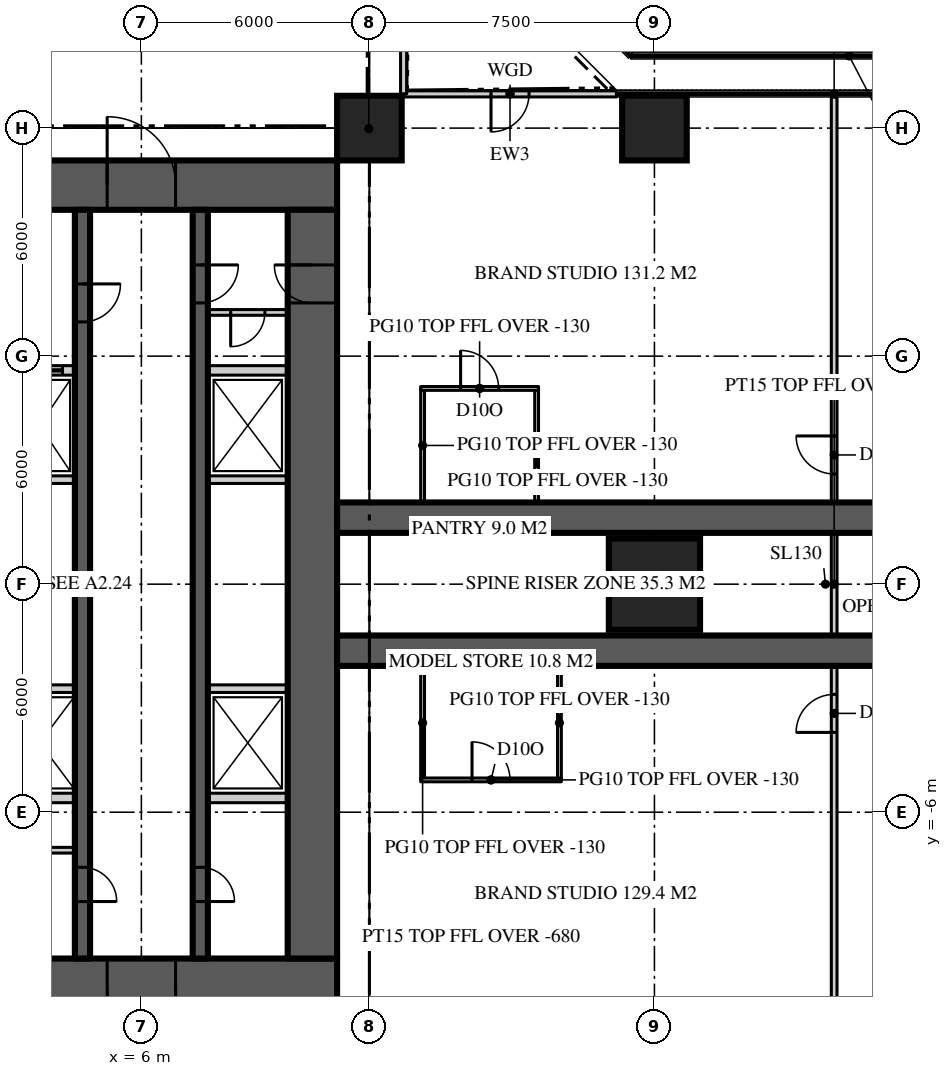
"""IFC4 building model, lengths in metres.
Left out: names, types, materials, properties, quantities, classifications, styles, units other than length and angle.
Written with IfcOpenShell. Run it as: python <this file> out.ifc"""

import sys

from ifc_helpers import new_model, si_unit, direction, frame, frame_2d, origin, origin_2d, place, context, subcontext, project, spatial, rectangle, extrude, element, fill, save


model = new_model("IFC4")
c1 = context("Model", 3, precision=1e-05, world=origin(), true_north=direction((0.0, 1.0)))
c2 = subcontext(c1, "Body", "Model", "MODEL_VIEW")
j1 = project(units=[si_unit("LENGTHUNIT", "METRE"), si_unit("PLANEANGLEUNIT", "RADIAN")], contexts=[c1])
p1 = place(None, origin())
s1 = spatial("IfcSite", under=j1, at=p1, CompositionType="ELEMENT")
p2 = place(p1, origin())
s2 = spatial("IfcBuilding", under=s1, at=p2, CompositionType="ELEMENT")
p3 = place(p2, frame((0.0, 0.0, 182.7)))
s3 = spatial("IfcBuildingStorey", under=s2, at=p3, CompositionType="ELEMENT", Elevation=182.7)
p4 = place(p3, frame((-11.15, 10.5, 0.0), z_axis=(0.0, 0.0, 1.0), x_axis=(1.0, 0.0, 0.0)))
e1 = element("IfcWall", 1, at=p4, inside=s3, PredefinedType="SHEAR", context=c2, shape_type="SweptSolid", body=[
    extrude(rectangle(XDim=22.3, YDim=1.3, at=frame_2d((11.15, 0.0))), origin(), (0.0, 0.0, 1.0), 3.9),
])
p5 = place(p4, frame((4.25, 0.0, 0.0)))
e2 = element("IfcOpeningElement", 2, at=p5, cuts=e1, PredefinedType="OPENING", context=c2, shape_type="SweptSolid", body=[
    extrude(rectangle(XDim=1.8, YDim=2.2, at=frame_2d((0.9, 1.1))), frame((0.0, 0.66, 0.0), z_axis=(0.0, -1.0, 0.0), x_axis=(1.0, 0.0, 0.0)), (0.0, 0.0, 1.0), 1.32),
])
p6 = place(p4, frame((16.25, 0.0, 0.0)))
e3 = element("IfcOpeningElement", 3, at=p6, cuts=e1, PredefinedType="OPENING", context=c2, shape_type="SweptSolid", body=[
    extrude(rectangle(XDim=1.8, YDim=2.2, at=frame_2d((0.9, 1.1))), frame((0.0, 0.66, 0.0), z_axis=(0.0, -1.0, 0.0), x_axis=(1.0, 0.0, 0.0)), (0.0, 0.0, 1.0), 1.32),
])
p7 = place(p3, frame((11.15, -10.5, 0.0), z_axis=(0.0, 0.0, 1.0), x_axis=(-1.0, 0.0, 0.0)))
e4 = element("IfcWall", 4, at=p7, inside=s3, PredefinedType="SHEAR", context=c2, shape_type="SweptSolid", body=[
    extrude(rectangle(XDim=22.3, YDim=1.3, at=frame_2d((11.15, 0.0))), origin(), (0.0, 0.0, 1.0), 3.9),
])
p8 = place(p7, frame((16.25, 0.0, 0.0)))
e5 = element("IfcOpeningElement", 5, at=p8, cuts=e4, PredefinedType="OPENING", context=c2, shape_type="SweptSolid", body=[
    extrude(rectangle(XDim=1.8, YDim=2.2, at=frame_2d((0.9, 1.1))), frame((0.0, 0.66, 0.0), z_axis=(0.0, -1.0, 0.0), x_axis=(1.0, 0.0, 0.0)), (0.0, 0.0, 1.0), 1.32),
])
p9 = place(p7, frame((4.25, 0.0, 0.0)))
e6 = element("IfcOpeningElement", 6, at=p9, cuts=e4, PredefinedType="OPENING", context=c2, shape_type="SweptSolid", body=[
    extrude(rectangle(XDim=1.8, YDim=2.2, at=frame_2d((0.9, 1.1))), frame((0.0, 0.66, 0.0), z_axis=(0.0, -1.0, 0.0), x_axis=(1.0, 0.0, 0.0)), (0.0, 0.0, 1.0), 1.32),
])
p10 = place(p3, frame((10.5, -9.85, 0.0), z_axis=(0.0, 0.0, 1.0), x_axis=(0.0, 1.0, 0.0)))
e7 = element("IfcWall", 7, at=p10, inside=s3, PredefinedType="SHEAR", context=c2, shape_type="SweptSolid", body=[
    extrude(rectangle(XDim=19.7, YDim=1.3, at=frame_2d((9.85, 0.0))), origin(), (0.0, 0.0, 1.0), 3.9),
])
p11 = place(p10, frame((17.25, 0.0, 0.0)))
e8 = element("IfcOpeningElement", 8, at=p11, cuts=e7, PredefinedType="OPENING", context=c2, shape_type="SweptSolid", body=[
    extrude(rectangle(XDim=1.0, YDim=2.2, at=frame_2d((0.5, 1.1))), frame((0.0, 0.66, 0.0), z_axis=(0.0, -1.0, 0.0), x_axis=(1.0, 0.0, 0.0)), (0.0, 0.0, 1.0), 1.32),
])
for number, where, z_axis, x_axis in (
    (9, (11.15, -1.75, 0.0), (0.0, 0.0, 1.0), (1.0, 0.0, 0.0)),
    (10, (11.15, 1.75, 0.0), (0.0, 0.0, 1.0), (1.0, 0.0, 0.0)),
):
    element("IfcWall", number, at=place(p3, frame(where, z_axis=z_axis, x_axis=x_axis)), inside=s3, PredefinedType="SHEAR", context=c2, shape_type="SweptSolid", body=[
        extrude(rectangle(XDim=15.25, YDim=0.8, at=frame_2d((7.625, 0.0))), origin(), (0.0, 0.0, 1.0), 3.9),
    ])
p12 = place(p3, frame((19.5, 0.0, 0.0), z_axis=(0.0, 0.0, 1.0), x_axis=(1.0, 0.0, 0.0)))
e11 = element("IfcColumn", 11, at=p12, inside=s3, PredefinedType="COLUMN", context=c2, shape_type="SweptSolid", body=[
    extrude(rectangle(XDim=2.4, YDim=2.4, at=origin_2d()), origin(), (0.0, 0.0, 1.0), 3.9),
])
for number, where, z_axis, x_axis in (
    (12, (12.0, 12.0, 0.0), (0.0, 0.0, 1.0), (1.0, 0.0, 0.0)),
    (13, (19.5, 12.0, 0.0), (0.0, 0.0, 1.0), (1.0, 0.0, 0.0)),
):
    element("IfcColumn", number, at=place(p3, frame(where, z_axis=z_axis, x_axis=x_axis)), inside=s3, PredefinedType="COLUMN", context=c2, shape_type="SweptSolid", body=[
        extrude(rectangle(XDim=1.7, YDim=1.7, at=origin_2d()), origin(), (0.0, 0.0, 1.0), 3.9),
    ])
p13 = place(p3, frame((18.5, 12.9, 0.0), z_axis=(0.0, 0.0, 1.0), x_axis=(-1.0, 0.0, 0.0)))
e14 = element("IfcWall", 14, at=p13, inside=s3, PredefinedType="SOLIDWALL", context=c2, shape_type="SweptSolid", body=[
    extrude(rectangle(XDim=5.6, YDim=0.16, at=frame_2d((2.8, 0.0))), origin(), (0.0, 0.0, 1.0), 3.77),
])
p14 = place(p13, frame((2.3, 0.0, 0.0)))
e15 = element("IfcOpeningElement", 15, at=p14, cuts=e14, PredefinedType="OPENING", context=c2, shape_type="SweptSolid", body=[
    extrude(rectangle(XDim=1.0, YDim=2.2, at=frame_2d((0.5, 1.1))), frame((0.0, 0.09, 0.0), z_axis=(0.0, -1.0, 0.0), x_axis=(1.0, 0.0, 0.0)), (0.0, 0.0, 1.0), 0.18),
])
p15 = place(p3, frame((12.9, 12.9, 0.0), z_axis=(0.0, 0.0, 1.0), x_axis=(0.0, 1.0, 0.0)))
e16 = element("IfcWall", 16, at=p15, inside=s3, PredefinedType="SOLIDWALL", context=c2, shape_type="SweptSolid", body=[
    extrude(rectangle(XDim=5.6, YDim=0.16, at=frame_2d((2.8, 0.0))), origin(), (0.0, 0.0, 1.0), 3.77),
])
p16 = place(p3, frame((7.55, 9.85, 0.0), z_axis=(0.0, 0.0, 1.0), x_axis=(0.0, -1.0, 0.0)))
e17 = element("IfcWall", 17, at=p16, inside=s3, PredefinedType="SHEAR", context=c2, shape_type="SweptSolid", body=[
    extrude(rectangle(XDim=19.7, YDim=0.4, at=frame_2d((9.85, 0.0))), origin(), (0.0, 0.0, 1.0), 3.9),
])
p17 = place(p16, frame((1.45, 0.0, 0.0)))
e18 = element("IfcOpeningElement", 18, at=p17, cuts=e17, PredefinedType="OPENING", context=c2, shape_type="SweptSolid", body=[
    extrude(rectangle(XDim=1.0, YDim=2.2, at=frame_2d((0.5, 1.1))), frame((0.0, 0.21, 0.0), z_axis=(0.0, -1.0, 0.0), x_axis=(1.0, 0.0, 0.0)), (0.0, 0.0, 1.0), 0.42),
])
p18 = place(p16, frame((17.3, 0.0, 0.0)))
e19 = element("IfcOpeningElement", 19, at=p18, cuts=e17, PredefinedType="OPENING", context=c2, shape_type="SweptSolid", body=[
    extrude(rectangle(XDim=0.9, YDim=2.1, at=frame_2d((0.45, 1.05))), frame((0.0, 0.21, 0.0), z_axis=(0.0, -1.0, 0.0), x_axis=(1.0, 0.0, 0.0)), (0.0, 0.0, 1.0), 0.42),
])
p19 = place(p3, frame((4.45, 9.85, 0.0), z_axis=(0.0, 0.0, 1.0), x_axis=(0.0, -1.0, 0.0)))
e20 = element("IfcWall", 20, at=p19, inside=s3, PredefinedType="SHEAR", context=c2, shape_type="SweptSolid", body=[
    extrude(rectangle(XDim=19.7, YDim=0.4, at=frame_2d((9.85, 0.0))), origin(), (0.0, 0.0, 1.0), 3.9),
])
p20 = place(p19, frame((1.95, 0.0, 0.0)))
e21 = element("IfcOpeningElement", 21, at=p20, cuts=e20, PredefinedType="OPENING", context=c2, shape_type="SweptSolid", body=[
    extrude(rectangle(XDim=1.0, YDim=2.2, at=frame_2d((0.5, 1.1))), frame((0.0, 0.21, 0.0), z_axis=(0.0, -1.0, 0.0), x_axis=(1.0, 0.0, 0.0)), (0.0, 0.0, 1.0), 0.42),
])
p21 = place(p19, frame((17.3, 0.0, 0.0)))
e22 = element("IfcOpeningElement", 22, at=p21, cuts=e20, PredefinedType="OPENING", context=c2, shape_type="SweptSolid", body=[
    extrude(rectangle(XDim=0.9, YDim=2.1, at=frame_2d((0.45, 1.05))), frame((0.0, 0.21, 0.0), z_axis=(0.0, -1.0, 0.0), x_axis=(1.0, 0.0, 0.0)), (0.0, 0.0, 1.0), 0.42),
])
p22 = place(p3, frame((2.4, 5.625, 0.0), z_axis=(0.0, 0.0, 1.0), x_axis=(1.0, 0.0, 0.0)))
e23 = element("IfcWall", 23, at=p22, inside=s3, PredefinedType="SOLIDWALL", context=c2, shape_type="SweptSolid", body=[
    extrude(rectangle(XDim=1.85, YDim=0.25, at=frame_2d((0.925, 0.0))), origin(), (0.0, 0.0, 1.0), 3.7),
])
p23 = place(p22, frame((0.325, 0.0, 0.0)))
e24 = element("IfcOpeningElement", 24, at=p23, cuts=e23, PredefinedType="OPENING", context=c2, shape_type="SweptSolid", body=[
    extrude(rectangle(XDim=1.2, YDim=2.2, at=frame_2d((0.6, 1.1))), frame((0.0, 0.135, 0.0), z_axis=(0.0, -1.0, 0.0), x_axis=(1.0, 0.0, 0.0)), (0.0, 0.0, 1.0), 0.27),
])
p24 = place(p3, frame((7.75, 5.625, 0.0), z_axis=(0.0, 0.0, 1.0), x_axis=(1.0, 0.0, 0.0)))
e25 = element("IfcWall", 25, at=p24, inside=s3, PredefinedType="SOLIDWALL", context=c2, shape_type="SweptSolid", body=[
    extrude(rectangle(XDim=2.1, YDim=0.25, at=frame_2d((1.05, 0.0))), origin(), (0.0, 0.0, 1.0), 3.7),
])
p25 = place(p3, frame((2.4, -5.625, 0.0), z_axis=(0.0, 0.0, 1.0), x_axis=(1.0, 0.0, 0.0)))
e26 = element("IfcWall", 26, at=p25, inside=s3, PredefinedType="SOLIDWALL", context=c2, shape_type="SweptSolid", body=[
    extrude(rectangle(XDim=1.85, YDim=0.25, at=frame_2d((0.925, 0.0))), origin(), (0.0, 0.0, 1.0), 3.7),
])
p26 = place(p3, frame((7.75, -5.625, 0.0), z_axis=(0.0, 0.0, 1.0), x_axis=(1.0, 0.0, 0.0)))
e27 = element("IfcWall", 27, at=p26, inside=s3, PredefinedType="SOLIDWALL", context=c2, shape_type="SweptSolid", body=[
    extrude(rectangle(XDim=2.1, YDim=0.25, at=frame_2d((1.05, 0.0))), origin(), (0.0, 0.0, 1.0), 3.7),
])
p27 = place(p3, frame((2.4, -2.75, 0.0), z_axis=(0.0, 0.0, 1.0), x_axis=(1.0, 0.0, 0.0)))
e28 = element("IfcWall", 28, at=p27, inside=s3, PredefinedType="SOLIDWALL", context=c2, shape_type="SweptSolid", body=[
    extrude(rectangle(XDim=1.85, YDim=0.2, at=frame_2d((0.925, 0.0))), origin(), (0.0, 0.0, 1.0), 3.7),
])
p28 = place(p3, frame((7.75, -2.75, 0.0), z_axis=(0.0, 0.0, 1.0), x_axis=(1.0, 0.0, 0.0)))
e29 = element("IfcWall", 29, at=p28, inside=s3, PredefinedType="SOLIDWALL", context=c2, shape_type="SweptSolid", body=[
    extrude(rectangle(XDim=2.1, YDim=0.2, at=frame_2d((1.05, 0.0))), origin(), (0.0, 0.0, 1.0), 3.7),
])
p29 = place(p3, frame((2.4, 2.75, 0.0), z_axis=(0.0, 0.0, 1.0), x_axis=(1.0, 0.0, 0.0)))
e30 = element("IfcWall", 30, at=p29, inside=s3, PredefinedType="SOLIDWALL", context=c2, shape_type="SweptSolid", body=[
    extrude(rectangle(XDim=1.85, YDim=0.2, at=frame_2d((0.925, 0.0))), origin(), (0.0, 0.0, 1.0), 3.7),
])
p30 = place(p3, frame((7.75, 2.75, 0.0), z_axis=(0.0, 0.0, 1.0), x_axis=(1.0, 0.0, 0.0)))
e31 = element("IfcWall", 31, at=p30, inside=s3, PredefinedType="SOLIDWALL", context=c2, shape_type="SweptSolid", body=[
    extrude(rectangle(XDim=2.1, YDim=0.2, at=frame_2d((1.05, 0.0))), origin(), (0.0, 0.0, 1.0), 3.7),
])
p31 = place(p3, frame((24.229, -12.82, 0.0), z_axis=(0.0, 0.0, 1.0), x_axis=(0.0, 1.0, 0.0)))
e32 = element("IfcWall", 32, at=p31, inside=s3, PredefinedType="PARTITIONING", context=c2, shape_type="SweptSolid", body=[
    extrude(rectangle(XDim=25.64, YDim=0.15, at=frame_2d((12.82, 0.0))), origin(), (0.0, 0.0, 1.0), 3.77),
])
p32 = place(p31, frame((15.72, 0.0, 0.0)))
e33 = element("IfcOpeningElement", 33, at=p32, cuts=e32, PredefinedType="OPENING", context=c2, shape_type="SweptSolid", body=[
    extrude(rectangle(XDim=1.0, YDim=2.2, at=frame_2d((0.5, 1.1))), frame((0.0, 0.085, 0.0), z_axis=(0.0, -1.0, 0.0), x_axis=(1.0, 0.0, 0.0)), (0.0, 0.0, 1.0), 0.17),
])
p33 = place(p31, frame((8.92, 0.0, 0.0)))
e34 = element("IfcOpeningElement", 34, at=p33, cuts=e32, PredefinedType="OPENING", context=c2, shape_type="SweptSolid", body=[
    extrude(rectangle(XDim=1.0, YDim=2.2, at=frame_2d((0.5, 1.1))), frame((0.0, 0.085, 0.0), z_axis=(0.0, -1.0, 0.0), x_axis=(1.0, 0.0, 0.0)), (0.0, 0.0, 1.0), 0.17),
])
for number, where, z_axis, x_axis in (
    (35, (13.4, 2.15, 0.0), (0.0, 0.0, 1.0), (0.0, 1.0, 0.0)),
    (36, (16.4, 2.15, 0.0), (0.0, 0.0, 1.0), (0.0, 1.0, 0.0)),
):
    element("IfcWall", number, at=place(p3, frame(where, z_axis=z_axis, x_axis=x_axis)), inside=s3, PredefinedType="PARTITIONING", context=c2, shape_type="SweptSolid", body=[
        extrude(rectangle(XDim=3.0, YDim=0.1, at=frame_2d((1.5, 0.0))), origin(), (0.0, 0.0, 1.0), 3.77),
    ])
p34 = place(p3, frame((13.35, 5.15, 0.0), z_axis=(0.0, 0.0, 1.0), x_axis=(1.0, 0.0, 0.0)))
e37 = element("IfcWall", 37, at=p34, inside=s3, PredefinedType="PARTITIONING", context=c2, shape_type="SweptSolid", body=[
    extrude(rectangle(XDim=3.1, YDim=0.1, at=frame_2d((1.55, 0.0))), origin(), (0.0, 0.0, 1.0), 3.77),
])
p35 = place(p34, frame((1.05, 0.0, 0.0)))
e38 = element("IfcOpeningElement", 38, at=p35, cuts=e37, PredefinedType="OPENING", context=c2, shape_type="SweptSolid", body=[
    extrude(rectangle(XDim=1.0, YDim=2.2, at=frame_2d((0.5, 1.1))), frame((0.0, 0.06, 0.0), z_axis=(0.0, -1.0, 0.0), x_axis=(1.0, 0.0, 0.0)), (0.0, 0.0, 1.0), 0.12),
])
for number, where, z_axis, x_axis in (
    (39, (13.4, -2.15, 0.0), (0.0, 0.0, 1.0), (0.0, -1.0, 0.0)),
    (40, (17.0, -2.15, 0.0), (0.0, 0.0, 1.0), (0.0, -1.0, 0.0)),
):
    element("IfcWall", number, at=place(p3, frame(where, z_axis=z_axis, x_axis=x_axis)), inside=s3, PredefinedType="PARTITIONING", context=c2, shape_type="SweptSolid", body=[
        extrude(rectangle(XDim=3.0, YDim=0.1, at=frame_2d((1.5, 0.0))), origin(), (0.0, 0.0, 1.0), 3.77),
    ])
p36 = place(p3, frame((13.35, -5.15, 0.0), z_axis=(0.0, 0.0, 1.0), x_axis=(1.0, 0.0, 0.0)))
e41 = element("IfcWall", 41, at=p36, inside=s3, PredefinedType="PARTITIONING", context=c2, shape_type="SweptSolid", body=[
    extrude(rectangle(XDim=3.7, YDim=0.1, at=frame_2d((1.85, 0.0))), origin(), (0.0, 0.0, 1.0), 3.77),
])
p37 = place(p36, frame((1.35, 0.0, 0.0)))
e42 = element("IfcOpeningElement", 42, at=p37, cuts=e41, PredefinedType="OPENING", context=c2, shape_type="SweptSolid", body=[
    extrude(rectangle(XDim=1.0, YDim=2.2, at=frame_2d((0.5, 1.1))), frame((0.0, 0.06, 0.0), z_axis=(0.0, -1.0, 0.0), x_axis=(1.0, 0.0, 0.0)), (0.0, 0.0, 1.0), 0.12),
])
p38 = place(p3, frame((11.15, 11.15, 0.0), z_axis=(0.0, 0.0, 1.0), x_axis=(0.707106781187, 0.707106781187, 0.0)))
e43 = element("IfcWall", 43, at=p38, inside=s3, PredefinedType="PARTITIONING", context=c2, shape_type="SweptSolid", body=[
    extrude(rectangle(XDim=2.362, YDim=0.15, at=frame_2d((1.181, 0.0))), origin(), (0.0, 0.0, 1.0), 3.22),
])
p39 = place(p3, frame((2.4, -7.0, 0.0), z_axis=(0.0, 0.0, 1.0), x_axis=(1.0, 0.0, 0.0)))
e44 = element("IfcWall", 44, at=p39, inside=s3, PredefinedType="SOLIDWALL", context=c2, shape_type="SweptSolid", body=[
    extrude(rectangle(XDim=1.85, YDim=0.15, at=frame_2d((0.925, 0.0))), origin(), (0.0, 0.0, 1.0), 3.77),
])
p40 = place(p39, frame((0.1, 0.0, 0.0)))
e45 = element("IfcOpeningElement", 45, at=p40, cuts=e44, PredefinedType="OPENING", context=c2, shape_type="SweptSolid", body=[
    extrude(rectangle(XDim=0.9, YDim=2.1, at=frame_2d((0.45, 1.05))), frame((0.0, 0.085, 0.0), z_axis=(0.0, -1.0, 0.0), x_axis=(1.0, 0.0, 0.0)), (0.0, 0.0, 1.0), 0.17),
])
p41 = place(p3, frame((9.85, 7.15, 0.0), z_axis=(0.0, 0.0, 1.0), x_axis=(-1.0, 0.0, 0.0)))
e46 = element("IfcWall", 46, at=p41, inside=s3, PredefinedType="SOLIDWALL", context=c2, shape_type="SweptSolid", body=[
    extrude(rectangle(XDim=2.1, YDim=0.15, at=frame_2d((1.05, 0.0))), origin(), (0.0, 0.0, 1.0), 3.77),
])
p42 = place(p41, frame((0.6, 0.0, 0.0)))
e47 = element("IfcOpeningElement", 47, at=p42, cuts=e46, PredefinedType="OPENING", context=c2, shape_type="SweptSolid", body=[
    extrude(rectangle(XDim=0.9, YDim=2.1, at=frame_2d((0.45, 1.05))), frame((0.0, 0.085, 0.0), z_axis=(0.0, -1.0, 0.0), x_axis=(1.0, 0.0, 0.0)), (0.0, 0.0, 1.0), 0.17),
])
p43 = place(p14, origin())
e48 = element("IfcDoor", 48, at=p43, inside=s3, OperationType="SINGLE_SWING_RIGHT", PredefinedType="DOOR", context=c2, shape_type="SweptSolid", body=[
    extrude(rectangle(XDim=1.0, YDim=2.2, at=frame_2d((0.5, 1.1))), frame((0.0, 0.025, 0.0), z_axis=(0.0, -1.0, 0.0), x_axis=(1.0, 0.0, 0.0)), (0.0, 0.0, 1.0), 0.05),
])
fill(e15, e48)
p44 = place(p6, origin())
e49 = element("IfcDoor", 49, at=p44, inside=s3, OperationType="DOUBLE_DOOR_DOUBLE_SWING", PredefinedType="DOOR", context=c2, shape_type="SweptSolid", body=[
    extrude(rectangle(XDim=1.8, YDim=2.2, at=frame_2d((0.9, 1.1))), frame((0.0, 0.025, 0.0), z_axis=(0.0, -1.0, 0.0), x_axis=(1.0, 0.0, 0.0)), (0.0, 0.0, 1.0), 0.05),
])
fill(e3, e49)
p45 = place(p9, origin())
e50 = element("IfcDoor", 50, at=p45, inside=s3, OperationType="DOUBLE_DOOR_DOUBLE_SWING", PredefinedType="DOOR", context=c2, shape_type="SweptSolid", body=[
    extrude(rectangle(XDim=1.8, YDim=2.2, at=frame_2d((0.9, 1.1))), frame((0.0, 0.025, 0.0), z_axis=(0.0, -1.0, 0.0), x_axis=(1.0, 0.0, 0.0)), (0.0, 0.0, 1.0), 0.05),
])
fill(e6, e50)
p46 = place(p17, origin())
e51 = element("IfcDoor", 51, at=p46, inside=s3, OperationType="SINGLE_SWING_LEFT", PredefinedType="DOOR", context=c2, shape_type="SweptSolid", body=[
    extrude(rectangle(XDim=1.0, YDim=2.2, at=frame_2d((0.5, 1.1))), frame((0.0, 0.025, 0.0), z_axis=(0.0, -1.0, 0.0), x_axis=(1.0, 0.0, 0.0)), (0.0, 0.0, 1.0), 0.05),
])
fill(e18, e51)
p47 = place(p11, origin())
e52 = element("IfcDoor", 52, at=p47, inside=s3, OperationType="SINGLE_SWING_RIGHT", PredefinedType="DOOR", context=c2, shape_type="SweptSolid", body=[
    extrude(rectangle(XDim=1.0, YDim=2.2, at=frame_2d((0.5, 1.1))), frame((0.0, 0.025, 0.0), z_axis=(0.0, -1.0, 0.0), x_axis=(1.0, 0.0, 0.0)), (0.0, 0.0, 1.0), 0.05),
])
fill(e8, e52)
p48 = place(p20, origin())
e53 = element("IfcDoor", 53, at=p48, inside=s3, OperationType="SINGLE_SWING_LEFT", PredefinedType="DOOR", context=c2, shape_type="SweptSolid", body=[
    extrude(rectangle(XDim=1.0, YDim=2.2, at=frame_2d((0.5, 1.1))), frame((0.0, 0.025, 0.0), z_axis=(0.0, -1.0, 0.0), x_axis=(1.0, 0.0, 0.0)), (0.0, 0.0, 1.0), 0.05),
])
fill(e21, e53)
p49 = place(p18, origin())
e54 = element("IfcDoor", 54, at=p49, inside=s3, OperationType="SINGLE_SWING_RIGHT", PredefinedType="DOOR", context=c2, shape_type="SweptSolid", body=[
    extrude(rectangle(XDim=0.9, YDim=2.1, at=frame_2d((0.45, 1.05))), frame((0.0, 0.025, 0.0), z_axis=(0.0, -1.0, 0.0), x_axis=(1.0, 0.0, 0.0)), (0.0, 0.0, 1.0), 0.05),
])
fill(e19, e54)
p50 = place(p21, origin())
e55 = element("IfcDoor", 55, at=p50, inside=s3, OperationType="SINGLE_SWING_RIGHT", PredefinedType="DOOR", context=c2, shape_type="SweptSolid", body=[
    extrude(rectangle(XDim=0.9, YDim=2.1, at=frame_2d((0.45, 1.05))), frame((0.0, 0.025, 0.0), z_axis=(0.0, -1.0, 0.0), x_axis=(1.0, 0.0, 0.0)), (0.0, 0.0, 1.0), 0.05),
])
fill(e22, e55)
p51 = place(p23, origin())
e56 = element("IfcDoor", 56, at=p51, inside=s3, OperationType="SLIDING_TO_LEFT", PredefinedType="DOOR", context=c2, shape_type="SweptSolid", body=[
    extrude(rectangle(XDim=1.2, YDim=2.2, at=frame_2d((0.6, 1.1))), frame((0.0, 0.025, 0.0), z_axis=(0.0, -1.0, 0.0), x_axis=(1.0, 0.0, 0.0)), (0.0, 0.0, 1.0), 0.05),
])
fill(e24, e56)
p52 = place(p32, origin())
e57 = element("IfcDoor", 57, at=p52, inside=s3, OperationType="SINGLE_SWING_RIGHT", PredefinedType="DOOR", context=c2, shape_type="SweptSolid", body=[
    extrude(rectangle(XDim=1.0, YDim=2.2, at=frame_2d((0.5, 1.1))), frame((0.0, 0.025, 0.0), z_axis=(0.0, -1.0, 0.0), x_axis=(1.0, 0.0, 0.0)), (0.0, 0.0, 1.0), 0.05),
])
fill(e33, e57)
p53 = place(p33, origin())
e58 = element("IfcDoor", 58, at=p53, inside=s3, OperationType="SINGLE_SWING_LEFT", PredefinedType="DOOR", context=c2, shape_type="SweptSolid", body=[
    extrude(rectangle(XDim=1.0, YDim=2.2, at=frame_2d((0.5, 1.1))), frame((0.0, 0.025, 0.0), z_axis=(0.0, -1.0, 0.0), x_axis=(1.0, 0.0, 0.0)), (0.0, 0.0, 1.0), 0.05),
])
fill(e34, e58)
p54 = place(p35, origin())
e59 = element("IfcDoor", 59, at=p54, inside=s3, OperationType="SINGLE_SWING_LEFT", PredefinedType="DOOR", context=c2, shape_type="SweptSolid", body=[
    extrude(rectangle(XDim=1.0, YDim=2.2, at=frame_2d((0.5, 1.1))), frame((0.0, 0.025, 0.0), z_axis=(0.0, -1.0, 0.0), x_axis=(1.0, 0.0, 0.0)), (0.0, 0.0, 1.0), 0.05),
])
fill(e38, e59)
p55 = place(p37, origin())
e60 = element("IfcDoor", 60, at=p55, inside=s3, OperationType="SINGLE_SWING_LEFT", PredefinedType="DOOR", context=c2, shape_type="SweptSolid", body=[
    extrude(rectangle(XDim=1.0, YDim=2.2, at=frame_2d((0.5, 1.1))), frame((0.0, 0.025, 0.0), z_axis=(0.0, -1.0, 0.0), x_axis=(1.0, 0.0, 0.0)), (0.0, 0.0, 1.0), 0.05),
])
fill(e42, e60)
p56 = place(p42, origin())
e61 = element("IfcDoor", 61, at=p56, inside=s3, OperationType="SINGLE_SWING_RIGHT", PredefinedType="DOOR", context=c2, shape_type="SweptSolid", body=[
    extrude(rectangle(XDim=0.9, YDim=2.1, at=frame_2d((0.45, 1.05))), frame((0.0, 0.025, 0.0), z_axis=(0.0, -1.0, 0.0), x_axis=(1.0, 0.0, 0.0)), (0.0, 0.0, 1.0), 0.05),
])
fill(e47, e61)
save(model, sys.argv[1])
